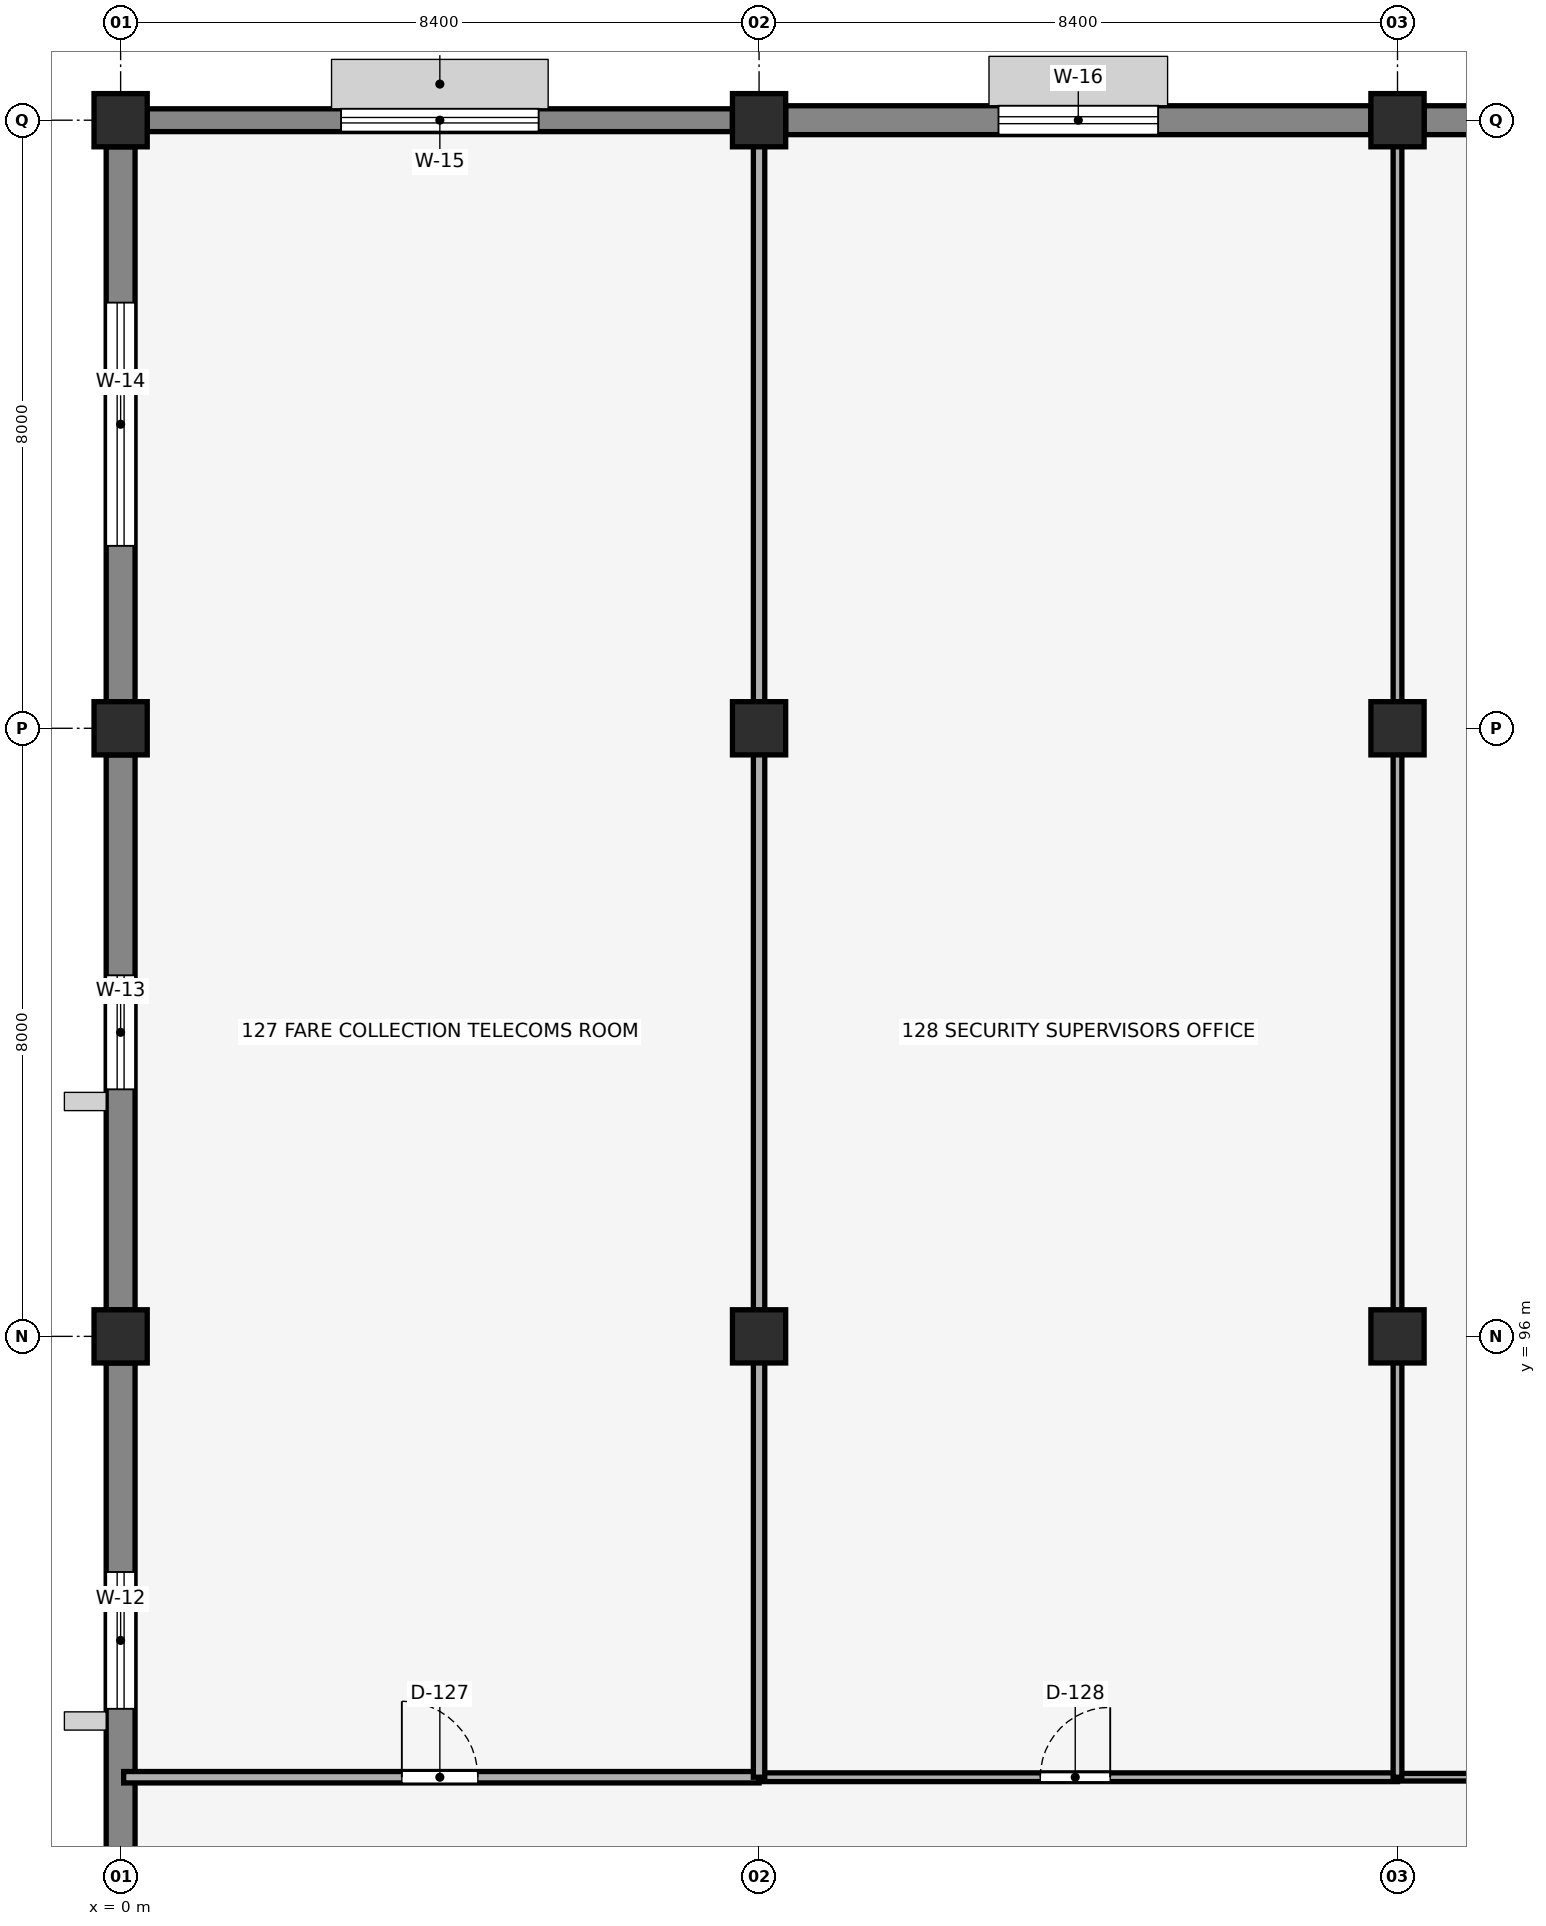
"""IFC4 building model, lengths in metres.
Left out: names, types, materials, properties, quantities, classifications, styles, units other than length and angle.
Written with IfcOpenShell. Run it as: python <this file> out.ifc"""

import sys

from ifc_helpers import new_model, si_unit, direction, frame, frame_2d, origin, origin_2d, place, context, subcontext, project, spatial, rectangle, extrude, element, fill, save


model = new_model("IFC4")
c1 = context("Model", 3, precision=1e-05, world=origin(), true_north=direction((0.0, 1.0)))
c2 = subcontext(c1, "Body", "Model", "MODEL_VIEW")
j1 = project(units=[si_unit("LENGTHUNIT", "METRE"), si_unit("PLANEANGLEUNIT", "RADIAN")], contexts=[c1])
p1 = place(None, origin())
s1 = spatial("IfcSite", under=j1, at=p1, CompositionType="ELEMENT")
p2 = place(p1, origin())
s2 = spatial("IfcBuilding", under=s1, at=p2, CompositionType="ELEMENT")
p3 = place(p2, frame((0.0, 0.0, 5.44)))
s3 = spatial("IfcBuildingStorey", under=s2, at=p3, CompositionType="ELEMENT", Elevation=5.44)
for number, where, z_axis, x_axis in (
    (1, (0.0, 96.0, 0.0), (0.0, 0.0, 1.0), (1.0, 0.0, 0.0)),
    (2, (0.0, 104.0, 0.0), (0.0, 0.0, 1.0), (1.0, 0.0, 0.0)),
    (3, (0.0, 112.0, 0.0), (0.0, 0.0, 1.0), (1.0, 0.0, 0.0)),
    (4, (8.4, 96.0, 0.0), (0.0, 0.0, 1.0), (1.0, 0.0, 0.0)),
    (5, (8.4, 104.0, 0.0), (0.0, 0.0, 1.0), (1.0, 0.0, 0.0)),
    (6, (8.4, 112.0, 0.0), (0.0, 0.0, 1.0), (1.0, 0.0, 0.0)),
    (7, (16.8, 96.0, 0.0), (0.0, 0.0, 1.0), (1.0, 0.0, 0.0)),
    (8, (16.8, 104.0, 0.0), (0.0, 0.0, 1.0), (1.0, 0.0, 0.0)),
    (9, (16.8, 112.0, 0.0), (0.0, 0.0, 1.0), (1.0, 0.0, 0.0)),
):
    element("IfcColumn", number, at=place(p3, frame(where, z_axis=z_axis, x_axis=x_axis)), inside=s3, PredefinedType="COLUMN", context=c2, shape_type="SweptSolid", body=[
        extrude(rectangle(XDim=0.7, YDim=0.7, at=origin_2d()), origin(), (0.0, 0.0, 1.0), 3.8),
    ])
p4 = place(p3, frame((0.0, 88.35, 0.0), z_axis=(0.0, 0.0, 1.0), x_axis=(0.0, 1.0, 0.0)))
e10 = element("IfcWall", 10, at=p4, inside=s3, PredefinedType="SOLIDWALL", context=c2, shape_type="SweptSolid", body=[
    extrude(rectangle(XDim=7.3, YDim=0.38, at=frame_2d((3.65, 0.0))), origin(), (0.0, 0.0, 1.0), 3.442),
])
p5 = place(p4, frame((2.75, 0.0, 0.9), z_axis=(0.0, 0.0, 1.0), x_axis=(1.0, 0.0, 0.0)))
e11 = element("IfcOpeningElement", 11, at=p5, cuts=e10, PredefinedType="OPENING", context=c2, shape_type="SweptSolid", body=[
    extrude(rectangle(XDim=1.8, YDim=1.3, at=frame_2d((0.9, 0.65))), frame((0.0, 0.2, 0.0), z_axis=(0.0, -1.0, 0.0), x_axis=(1.0, 0.0, 0.0)), (0.0, 0.0, 1.0), 0.4),
])
p6 = place(p3, frame((0.0, 96.35, 0.0), z_axis=(0.0, 0.0, 1.0), x_axis=(0.0, 1.0, 0.0)))
e12 = element("IfcWall", 12, at=p6, inside=s3, PredefinedType="SOLIDWALL", context=c2, shape_type="SweptSolid", body=[
    extrude(rectangle(XDim=7.3, YDim=0.38, at=frame_2d((3.65, 0.0))), origin(), (0.0, 0.0, 1.0), 3.442),
])
p7 = place(p6, frame((2.9, 0.0, 0.9), z_axis=(0.0, 0.0, 1.0), x_axis=(1.0, 0.0, 0.0)))
e13 = element("IfcOpeningElement", 13, at=p7, cuts=e12, PredefinedType="OPENING", context=c2, shape_type="SweptSolid", body=[
    extrude(rectangle(XDim=1.5, YDim=1.4, at=frame_2d((0.75, 0.7))), frame((0.0, 0.2, 0.0), z_axis=(0.0, -1.0, 0.0), x_axis=(1.0, 0.0, 0.0)), (0.0, 0.0, 1.0), 0.4),
])
p8 = place(p3, frame((0.0, 104.35, 0.0), z_axis=(0.0, 0.0, 1.0), x_axis=(0.0, 1.0, 0.0)))
e14 = element("IfcWall", 14, at=p8, inside=s3, PredefinedType="SOLIDWALL", context=c2, shape_type="SweptSolid", body=[
    extrude(rectangle(XDim=7.3, YDim=0.38, at=frame_2d((3.65, 0.0))), origin(), (0.0, 0.0, 1.0), 3.442),
])
p9 = place(p8, frame((2.05, 0.0, 1.55), z_axis=(0.0, 0.0, 1.0), x_axis=(1.0, 0.0, 0.0)))
e15 = element("IfcOpeningElement", 15, at=p9, cuts=e14, PredefinedType="OPENING", context=c2, shape_type="SweptSolid", body=[
    extrude(rectangle(XDim=3.2, YDim=0.9, at=frame_2d((1.6, 0.45))), frame((0.0, 0.2, 0.0), z_axis=(0.0, -1.0, 0.0), x_axis=(1.0, 0.0, 0.0)), (0.0, 0.0, 1.0), 0.4),
])
p10 = place(p3, frame((0.35, 112.0, 0.0), z_axis=(0.0, 0.0, 1.0), x_axis=(1.0, 0.0, 0.0)))
e16 = element("IfcWall", 16, at=p10, inside=s3, PredefinedType="SOLIDWALL", context=c2, shape_type="SweptSolid", body=[
    extrude(rectangle(XDim=7.7, YDim=0.3, at=frame_2d((3.85, 0.0))), origin(), (0.0, 0.0, 1.0), 3.45),
])
p11 = place(p10, frame((2.55, 0.0, 1.55), z_axis=(0.0, 0.0, 1.0), x_axis=(1.0, 0.0, 0.0)))
e17 = element("IfcOpeningElement", 17, at=p11, cuts=e16, PredefinedType="OPENING", context=c2, shape_type="SweptSolid", body=[
    extrude(rectangle(XDim=2.6, YDim=0.85, at=frame_2d((1.3, 0.425))), frame((0.0, 0.16, 0.0), z_axis=(0.0, -1.0, 0.0), x_axis=(1.0, 0.0, 0.0)), (0.0, 0.0, 1.0), 0.32),
])
p12 = place(p3, frame((8.75, 112.0, 0.0), z_axis=(0.0, 0.0, 1.0), x_axis=(1.0, 0.0, 0.0)))
e18 = element("IfcWall", 18, at=p12, inside=s3, PredefinedType="SOLIDWALL", context=c2, shape_type="SweptSolid", body=[
    extrude(rectangle(XDim=7.7, YDim=0.38, at=frame_2d((3.85, 0.0))), origin(), (0.0, 0.0, 1.0), 3.45),
])
p13 = place(p12, frame((2.8, 0.0, 1.55), z_axis=(0.0, 0.0, 1.0), x_axis=(1.0, 0.0, 0.0)))
e19 = element("IfcOpeningElement", 19, at=p13, cuts=e18, PredefinedType="OPENING", context=c2, shape_type="SweptSolid", body=[
    extrude(rectangle(XDim=2.1, YDim=0.8, at=frame_2d((1.05, 0.4))), frame((0.0, 0.2, 0.0), z_axis=(0.0, -1.0, 0.0), x_axis=(1.0, 0.0, 0.0)), (0.0, 0.0, 1.0), 0.4),
])
p14 = place(p3, frame((17.15, 112.0, 0.0), z_axis=(0.0, 0.0, 1.0), x_axis=(1.0, 0.0, 0.0)))
e20 = element("IfcWall", 20, at=p14, inside=s3, PredefinedType="SOLIDWALL", context=c2, shape_type="SweptSolid", body=[
    extrude(rectangle(XDim=7.7, YDim=0.38, at=frame_2d((3.85, 0.0))), origin(), (0.0, 0.0, 1.0), 3.45),
])
p15 = place(p14, frame((3.375, 0.0, 0.65), z_axis=(0.0, 0.0, 1.0), x_axis=(1.0, 0.0, 0.0)))
e21 = element("IfcOpeningElement", 21, at=p15, cuts=e20, PredefinedType="OPENING", context=c2, shape_type="SweptSolid", body=[
    extrude(rectangle(XDim=0.95, YDim=2.1, at=frame_2d((0.475, 1.05))), frame((0.0, 0.2, 0.0), z_axis=(0.0, -1.0, 0.0), x_axis=(1.0, 0.0, 0.0)), (0.0, 0.0, 1.0), 0.4),
])
p16 = place(p3, frame((0.04, 90.2, 0.0), z_axis=(0.0, 0.0, 1.0), x_axis=(1.0, 0.0, 0.0)))
e22 = element("IfcWall", 22, at=p16, inside=s3, PredefinedType="PARTITIONING", context=c2, shape_type="SweptSolid", body=[
    extrude(rectangle(XDim=8.36, YDim=0.15, at=frame_2d((4.18, 0.0))), origin(), (0.0, 0.0, 1.0), 3.8),
])
p17 = place(p16, frame((3.66, 0.0, 0.0), z_axis=(0.0, 0.0, 1.0), x_axis=(1.0, 0.0, 0.0)))
e23 = element("IfcOpeningElement", 23, at=p17, cuts=e22, PredefinedType="OPENING", context=c2, shape_type="SweptSolid", body=[
    extrude(rectangle(XDim=1.0, YDim=2.15, at=frame_2d((0.5, 1.075))), frame((0.0, 0.085, 0.0), z_axis=(0.0, -1.0, 0.0), x_axis=(1.0, 0.0, 0.0)), (0.0, 0.0, 1.0), 0.17),
])
p18 = place(p3, frame((8.4, 90.2, 0.0), z_axis=(0.0, 0.0, 1.0), x_axis=(1.0, 0.0, 0.0)))
e24 = element("IfcWall", 24, at=p18, inside=s3, PredefinedType="PARTITIONING", context=c2, shape_type="SweptSolid", body=[
    extrude(rectangle(XDim=8.4, YDim=0.115, at=frame_2d((4.2, 0.0))), origin(), (0.0, 0.0, 1.0), 3.8),
])
p19 = place(p18, frame((3.7, 0.0, 0.0), z_axis=(0.0, 0.0, 1.0), x_axis=(1.0, 0.0, 0.0)))
e25 = element("IfcOpeningElement", 25, at=p19, cuts=e24, PredefinedType="OPENING", context=c2, shape_type="SweptSolid", body=[
    extrude(rectangle(XDim=0.92, YDim=2.12, at=frame_2d((0.46, 1.06))), frame((0.0, 0.067, 0.0), z_axis=(0.0, -1.0, 0.0), x_axis=(1.0, 0.0, 0.0)), (0.0, 0.0, 1.0), 0.135),
])
p20 = place(p3, frame((16.8, 90.2, 0.0), z_axis=(0.0, 0.0, 1.0), x_axis=(1.0, 0.0, 0.0)))
e26 = element("IfcWall", 26, at=p20, inside=s3, PredefinedType="PARTITIONING", context=c2, shape_type="SweptSolid", body=[
    extrude(rectangle(XDim=25.2, YDim=0.1, at=frame_2d((12.6, 0.0))), origin(), (0.0, 0.0, 1.0), 3.337),
])
p21 = place(p20, frame((3.7, 0.0, 0.0), z_axis=(0.0, 0.0, 1.0), x_axis=(1.0, 0.0, 0.0)))
e27 = element("IfcOpeningElement", 27, at=p21, cuts=e26, PredefinedType="OPENING", context=c2, shape_type="SweptSolid", body=[
    extrude(rectangle(XDim=0.9, YDim=2.1, at=frame_2d((0.45, 1.05))), frame((0.0, 0.06, 0.0), z_axis=(0.0, -1.0, 0.0), x_axis=(1.0, 0.0, 0.0)), (0.0, 0.0, 1.0), 0.12),
])
p22 = place(p3, frame((8.4, 90.2, 0.0), z_axis=(0.0, 0.0, 1.0), x_axis=(0.0, 1.0, 0.0)))
e28 = element("IfcWall", 28, at=p22, inside=s3, PredefinedType="PARTITIONING", context=c2, shape_type="SweptSolid", body=[
    extrude(rectangle(XDim=5.46, YDim=0.15, at=frame_2d((2.73, 0.0))), origin(), (0.0, 0.0, 1.0), 3.337),
])
for number, where, z_axis, x_axis in (
    (29, (8.4, 96.34, 0.0), (0.0, 0.0, 1.0), (0.0, 1.0, 0.0)),
    (30, (8.4, 104.34, 0.0), (0.0, 0.0, 1.0), (0.0, 1.0, 0.0)),
):
    element("IfcWall", number, at=place(p3, frame(where, z_axis=z_axis, x_axis=x_axis)), inside=s3, PredefinedType="PARTITIONING", context=c2, shape_type="SweptSolid", body=[
        extrude(rectangle(XDim=7.32, YDim=0.15, at=frame_2d((3.66, 0.0))), origin(), (0.0, 0.0, 1.0), 3.337),
    ])
p23 = place(p3, frame((16.8, 90.2, 0.0), z_axis=(0.0, 0.0, 1.0), x_axis=(0.0, 1.0, 0.0)))
e31 = element("IfcWall", 31, at=p23, inside=s3, PredefinedType="PARTITIONING", context=c2, shape_type="SweptSolid", body=[
    extrude(rectangle(XDim=5.46, YDim=0.115, at=frame_2d((2.73, 0.0))), origin(), (0.0, 0.0, 1.0), 3.337),
])
for number, where, z_axis, x_axis in (
    (32, (16.8, 96.34, 0.0), (0.0, 0.0, 1.0), (0.0, 1.0, 0.0)),
    (33, (16.8, 104.34, 0.0), (0.0, 0.0, 1.0), (0.0, 1.0, 0.0)),
):
    element("IfcWall", number, at=place(p3, frame(where, z_axis=z_axis, x_axis=x_axis)), inside=s3, PredefinedType="PARTITIONING", context=c2, shape_type="SweptSolid", body=[
        extrude(rectangle(XDim=7.32, YDim=0.115, at=frame_2d((3.66, 0.0))), origin(), (0.0, 0.0, 1.0), 3.337),
    ])
p24 = place(p5, origin())
e34 = element("IfcWindow", 34, at=p24, inside=s3, PartitioningType="DOUBLE_PANEL_VERTICAL", PredefinedType="WINDOW", context=c2, shape_type="SweptSolid", body=[
    extrude(rectangle(XDim=1.8, YDim=1.3, at=frame_2d((0.9, 0.65))), frame((0.0, 0.03, 0.0), z_axis=(0.0, -1.0, 0.0), x_axis=(1.0, 0.0, 0.0)), (0.0, 0.0, 1.0), 0.06),
])
fill(e11, e34)
p25 = place(p7, origin())
e35 = element("IfcWindow", 35, at=p25, inside=s3, PartitioningType="SINGLE_PANEL", PredefinedType="WINDOW", context=c2, shape_type="SweptSolid", body=[
    extrude(rectangle(XDim=1.5, YDim=1.4, at=frame_2d((0.75, 0.7))), frame((0.0, 0.03, 0.0), z_axis=(0.0, -1.0, 0.0), x_axis=(1.0, 0.0, 0.0)), (0.0, 0.0, 1.0), 0.06),
])
fill(e13, e35)
p26 = place(p9, origin())
e36 = element("IfcWindow", 36, at=p26, inside=s3, PartitioningType="TRIPLE_PANEL_HORIZONTAL", PredefinedType="WINDOW", context=c2, shape_type="SweptSolid", body=[
    extrude(rectangle(XDim=3.2, YDim=0.9, at=frame_2d((1.6, 0.45))), frame((0.0, 0.03, 0.0), z_axis=(0.0, -1.0, 0.0), x_axis=(1.0, 0.0, 0.0)), (0.0, 0.0, 1.0), 0.06),
])
fill(e15, e36)
p27 = place(p11, origin())
e37 = element("IfcWindow", 37, at=p27, inside=s3, PartitioningType="DOUBLE_PANEL_HORIZONTAL", PredefinedType="WINDOW", context=c2, shape_type="SweptSolid", body=[
    extrude(rectangle(XDim=2.6, YDim=0.85, at=frame_2d((1.3, 0.425))), frame((0.0, 0.03, 0.0), z_axis=(0.0, -1.0, 0.0), x_axis=(1.0, 0.0, 0.0)), (0.0, 0.0, 1.0), 0.06),
])
fill(e17, e37)
p28 = place(p13, origin())
e38 = element("IfcWindow", 38, at=p28, inside=s3, PartitioningType="DOUBLE_PANEL_HORIZONTAL", PredefinedType="WINDOW", context=c2, shape_type="SweptSolid", body=[
    extrude(rectangle(XDim=2.1, YDim=0.8, at=frame_2d((1.05, 0.4))), frame((0.0, 0.03, 0.0), z_axis=(0.0, -1.0, 0.0), x_axis=(1.0, 0.0, 0.0)), (0.0, 0.0, 1.0), 0.06),
])
fill(e19, e38)
p29 = place(p17, origin())
e39 = element("IfcDoor", 39, at=p29, inside=s3, OperationType="SINGLE_SWING_LEFT", PredefinedType="DOOR", context=c2, shape_type="SweptSolid", body=[
    extrude(rectangle(XDim=1.0, YDim=2.15, at=frame_2d((0.5, 1.075))), frame((0.0, 0.025, 0.0), z_axis=(0.0, -1.0, 0.0), x_axis=(1.0, 0.0, 0.0)), (0.0, 0.0, 1.0), 0.05),
])
fill(e23, e39)
p30 = place(p19, origin())
e40 = element("IfcDoor", 40, at=p30, inside=s3, OperationType="SINGLE_SWING_RIGHT", PredefinedType="DOOR", context=c2, shape_type="SweptSolid", body=[
    extrude(rectangle(XDim=0.92, YDim=2.12, at=frame_2d((0.46, 1.06))), frame((0.0, 0.025, 0.0), z_axis=(0.0, -1.0, 0.0), x_axis=(1.0, 0.0, 0.0)), (0.0, 0.0, 1.0), 0.05),
])
fill(e25, e40)
save(model, sys.argv[1])
